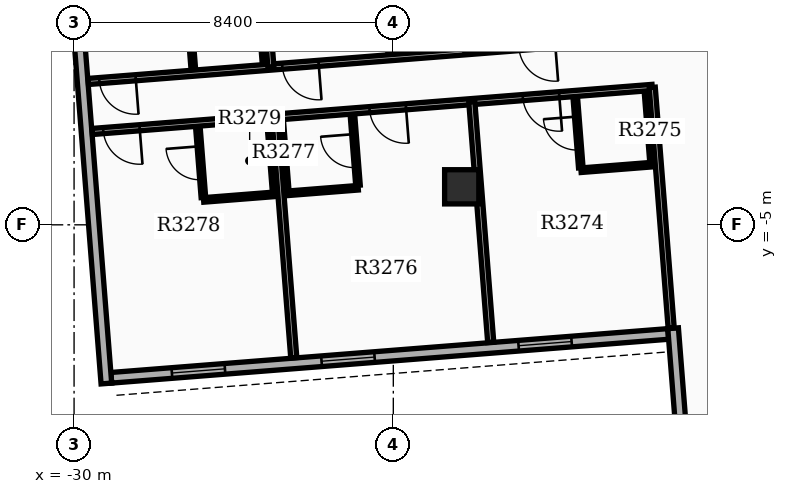
"""IFC4 building model, lengths in metres.
Left out: names, types, materials, properties, quantities, classifications, styles, units other than length and angle.
Written with IfcOpenShell. Run it as: python <this file> out.ifc"""

import sys

from ifc_helpers import new_model, si_unit, direction, frame, frame_2d, origin, origin_2d, place, context, subcontext, project, spatial, rectangle, extrude, element, fill, save


model = new_model("IFC4")
c1 = context("Model", 3, precision=1e-05, world=origin(), true_north=direction((0.0, 1.0)))
c2 = subcontext(c1, "Body", "Model", "MODEL_VIEW")
j1 = project(units=[si_unit("LENGTHUNIT", "METRE"), si_unit("PLANEANGLEUNIT", "RADIAN")], contexts=[c1])
p1 = place(None, origin())
s1 = spatial("IfcSite", under=j1, at=p1, CompositionType="ELEMENT")
p2 = place(p1, origin())
s2 = spatial("IfcBuilding", under=s1, at=p2, CompositionType="ELEMENT")
p3 = place(p2, frame((0.0, 0.0, 205.2)))
s3 = spatial("IfcBuildingStorey", under=s2, at=p3, CompositionType="ELEMENT", Elevation=205.2)
p4 = place(p3, frame((-19.8, -4.0, 0.0), z_axis=(0.0, 0.0, 1.0), x_axis=(1.0, 0.0, 0.0)))
e1 = element("IfcColumn", 1, at=p4, inside=s3, PredefinedType="COLUMN", context=c2, shape_type="SweptSolid", body=[
    extrude(rectangle(XDim=0.9, YDim=0.9, at=origin_2d()), origin(), (0.0, 0.0, 1.0), 3.9),
])
p5 = place(p3, frame((-29.021, -9.025, 0.0), z_axis=(0.0, 0.0, 1.0), x_axis=(0.996917526837, 0.078456642068, 0.0)))
e2 = element("IfcWall", 2, at=p5, inside=s3, PredefinedType="STANDARD", context=c2, shape_type="SweptSolid", body=[
    extrude(rectangle(XDim=14.7, YDim=0.28, at=frame_2d((7.35, 0.0))), origin(), (0.0, 0.0, 1.0), 3.18),
])
p6 = place(p5, frame((1.6, 0.0, 0.8)))
e3 = element("IfcOpeningElement", 3, at=p6, cuts=e2, PredefinedType="OPENING", context=c2, shape_type="SweptSolid", body=[
    extrude(rectangle(XDim=1.4, YDim=1.6, at=frame_2d((0.7, 0.8))), frame((0.0, 0.15, 0.0), z_axis=(0.0, -1.0, 0.0), x_axis=(1.0, 0.0, 0.0)), (0.0, 0.0, 1.0), 0.3),
])
p7 = place(p5, frame((5.55, 0.0, 0.8)))
e4 = element("IfcOpeningElement", 4, at=p7, cuts=e2, PredefinedType="OPENING", context=c2, shape_type="SweptSolid", body=[
    extrude(rectangle(XDim=1.4, YDim=1.6, at=frame_2d((0.7, 0.8))), frame((0.0, 0.15, 0.0), z_axis=(0.0, -1.0, 0.0), x_axis=(1.0, 0.0, 0.0)), (0.0, 0.0, 1.0), 0.3),
])
p8 = place(p5, frame((10.75, 0.0, 0.8)))
e5 = element("IfcOpeningElement", 5, at=p8, cuts=e2, PredefinedType="OPENING", context=c2, shape_type="SweptSolid", body=[
    extrude(rectangle(XDim=1.4, YDim=1.6, at=frame_2d((0.7, 0.8))), frame((0.0, 0.15, 0.0), z_axis=(0.0, -1.0, 0.0), x_axis=(1.0, 0.0, 0.0)), (0.0, 0.0, 1.0), 0.3),
])
p9 = place(p3, frame((-30.226, 4.502, 0.0), z_axis=(0.0, 0.0, 1.0), x_axis=(0.078457226018, -0.996917480881, 0.0)))
e6 = element("IfcWall", 6, at=p9, inside=s3, PredefinedType="STANDARD", context=c2, shape_type="SweptSolid", body=[
    extrude(rectangle(XDim=13.72, YDim=0.28, at=frame_2d((6.86, 0.0))), origin(), (0.0, 0.0, 1.0), 3.18),
])
p10 = place(p9, frame((0.85, 0.0, 0.85)))
e7 = element("IfcOpeningElement", 7, at=p10, cuts=e6, PredefinedType="OPENING", context=c2, shape_type="SweptSolid", body=[
    extrude(rectangle(XDim=1.0, YDim=1.5, at=frame_2d((0.5, 0.75))), frame((0.0, 0.15, 0.0), z_axis=(0.0, -1.0, 0.0), x_axis=(1.0, 0.0, 0.0)), (0.0, 0.0, 1.0), 0.3),
])
p11 = place(p3, frame((-14.238, -7.721, 0.0), z_axis=(0.0, 0.0, 1.0), x_axis=(0.078438149236, -0.996918982036, 0.0)))
e8 = element("IfcWall", 8, at=p11, inside=s3, PredefinedType="STANDARD", context=c2, shape_type="SweptSolid", body=[
    extrude(rectangle(XDim=6.86, YDim=0.28, at=frame_2d((3.43, 0.0))), origin(), (0.0, 0.0, 1.0), 3.18),
])
p12 = place(p3, frame((-14.89, -0.069, 0.0), z_axis=(0.0, 0.0, 1.0), x_axis=(-0.996917997344, -0.078450663299, 0.0)))
e9 = element("IfcWall", 9, at=p12, inside=s3, PredefinedType="PARTITIONING", context=c2, shape_type="SweptSolid", body=[
    extrude(rectangle(XDim=14.782, YDim=0.16, at=frame_2d((7.391, 0.0))), origin(), (0.0, 0.0, 1.0), 3.17),
])
p13 = place(p12, frame((2.456, 0.0, 0.0)))
e10 = element("IfcOpeningElement", 10, at=p13, cuts=e9, PredefinedType="OPENING", context=c2, shape_type="SweptSolid", body=[
    extrude(rectangle(XDim=0.96, YDim=2.15, at=frame_2d((0.48, 1.075))), frame((0.0, 0.09, 0.0), z_axis=(0.0, -1.0, 0.0), x_axis=(1.0, 0.0, 0.0)), (0.0, 0.0, 1.0), 0.18),
])
p14 = place(p12, frame((8.701, 0.0, 0.0)))
e11 = element("IfcOpeningElement", 11, at=p14, cuts=e9, PredefinedType="OPENING", context=c2, shape_type="SweptSolid", body=[
    extrude(rectangle(XDim=0.96, YDim=2.15, at=frame_2d((0.48, 1.075))), frame((0.0, 0.09, 0.0), z_axis=(0.0, -1.0, 0.0), x_axis=(1.0, 0.0, 0.0)), (0.0, 0.0, 1.0), 0.18),
])
p15 = place(p12, frame((13.53, 0.0, 0.0)))
e12 = element("IfcOpeningElement", 12, at=p15, cuts=e9, PredefinedType="OPENING", context=c2, shape_type="SweptSolid", body=[
    extrude(rectangle(XDim=0.96, YDim=2.15, at=frame_2d((0.48, 1.075))), frame((0.0, 0.09, 0.0), z_axis=(0.0, -1.0, 0.0), x_axis=(1.0, 0.0, 0.0)), (0.0, 0.0, 1.0), 0.18),
])
p16 = place(p3, frame((-24.821, -0.85, 0.0), z_axis=(0.0, 0.0, 1.0), x_axis=(-0.078480781753, 0.996915626769, 0.0)))
e13 = element("IfcWall", 13, at=p16, inside=s3, PredefinedType="PARTITIONING", context=c2, shape_type="SweptSolid", body=[
    extrude(rectangle(XDim=5.472, YDim=0.16, at=frame_2d((2.736, 0.0))), origin(), (0.0, 0.0, 1.0), 3.17),
])
p17 = place(p3, frame((-26.865, -0.871, 0.0), z_axis=(0.0, 0.0, 1.0), x_axis=(-0.0784709492, 0.996916400774, 0.0)))
e14 = element("IfcWall", 14, at=p17, inside=s3, PredefinedType="PARTITIONING", context=c2, shape_type="SweptSolid", body=[
    extrude(rectangle(XDim=1.82, YDim=0.12, at=frame_2d((0.91, 0.0))), origin(), (0.0, 0.0, 1.0), 3.17),
])
p18 = place(p17, frame((0.47, 0.0, 0.0)))
e15 = element("IfcOpeningElement", 15, at=p18, cuts=e14, PredefinedType="OPENING", context=c2, shape_type="SweptSolid", body=[
    extrude(rectangle(XDim=0.88, YDim=2.1, at=frame_2d((0.44, 1.05))), frame((0.0, 0.07, 0.0), z_axis=(0.0, -1.0, 0.0), x_axis=(1.0, 0.0, 0.0)), (0.0, 0.0, 1.0), 0.14),
])
p19 = place(p3, frame((-24.991, -0.723, 0.0), z_axis=(0.0, 0.0, 1.0), x_axis=(-0.078481444107, 0.996915574626, 0.0)))
e16 = element("IfcWall", 16, at=p19, inside=s3, PredefinedType="PARTITIONING", context=c2, shape_type="SweptSolid", body=[
    extrude(rectangle(XDim=1.82, YDim=0.12, at=frame_2d((0.91, 0.0))), origin(), (0.0, 0.0, 1.0), 3.17),
])
p20 = place(p3, frame((-14.787, -1.385, 0.0), z_axis=(0.0, 0.0, 1.0), x_axis=(-0.996917895694, -0.078451955012, 0.0)))
e17 = element("IfcWall", 17, at=p20, inside=s3, PredefinedType="PARTITIONING", context=c2, shape_type="SweptSolid", body=[
    extrude(rectangle(XDim=14.782, YDim=0.16, at=frame_2d((7.391, 0.0))), origin(), (0.0, 0.0, 1.0), 3.17),
])
p21 = place(p20, frame((2.456, 0.0, 0.0)))
e18 = element("IfcOpeningElement", 18, at=p21, cuts=e17, PredefinedType="OPENING", context=c2, shape_type="SweptSolid", body=[
    extrude(rectangle(XDim=0.96, YDim=2.15, at=frame_2d((0.48, 1.075))), frame((0.0, 0.09, 0.0), z_axis=(0.0, -1.0, 0.0), x_axis=(1.0, 0.0, 0.0)), (0.0, 0.0, 1.0), 0.18),
])
p22 = place(p20, frame((6.501, 0.0, 0.0)))
e19 = element("IfcOpeningElement", 19, at=p22, cuts=e17, PredefinedType="OPENING", context=c2, shape_type="SweptSolid", body=[
    extrude(rectangle(XDim=0.96, YDim=2.15, at=frame_2d((0.48, 1.075))), frame((0.0, 0.09, 0.0), z_axis=(0.0, -1.0, 0.0), x_axis=(1.0, 0.0, 0.0)), (0.0, 0.0, 1.0), 0.18),
])
p23 = place(p20, frame((13.53, 0.0, 0.0)))
e20 = element("IfcOpeningElement", 20, at=p23, cuts=e17, PredefinedType="OPENING", context=c2, shape_type="SweptSolid", body=[
    extrude(rectangle(XDim=0.96, YDim=2.15, at=frame_2d((0.48, 1.075))), frame((0.0, 0.09, 0.0), z_axis=(0.0, -1.0, 0.0), x_axis=(1.0, 0.0, 0.0)), (0.0, 0.0, 1.0), 0.18),
])
p24 = place(p3, frame((-14.787, -1.385, 0.0), z_axis=(0.0, 0.0, 1.0), x_axis=(0.078486363594, -0.99691518733, 0.0)))
e21 = element("IfcWall", 21, at=p24, inside=s3, PredefinedType="PARTITIONING", context=c2, shape_type="SweptSolid", body=[
    extrude(rectangle(XDim=6.352, YDim=0.16, at=frame_2d((3.176, 0.0))), origin(), (0.0, 0.0, 1.0), 3.17),
])
p25 = place(p3, frame((-19.535, -1.758, 0.0), z_axis=(0.0, 0.0, 1.0), x_axis=(0.078483356311, -0.996915424087, 0.0)))
e22 = element("IfcWall", 22, at=p25, inside=s3, PredefinedType="PARTITIONING", context=c2, shape_type="SweptSolid", body=[
    extrude(rectangle(XDim=6.352, YDim=0.16, at=frame_2d((3.176, 0.0))), origin(), (0.0, 0.0, 1.0), 3.17),
])
p26 = place(p3, frame((-16.667, -3.499, 0.0), z_axis=(0.0, 0.0, 1.0), x_axis=(-0.0784709492, 0.996916400774, 0.0)))
e23 = element("IfcWall", 23, at=p26, inside=s3, PredefinedType="PARTITIONING", context=c2, shape_type="SweptSolid", body=[
    extrude(rectangle(XDim=1.82, YDim=0.12, at=frame_2d((0.91, 0.0))), origin(), (0.0, 0.0, 1.0), 3.17),
])
p27 = place(p26, frame((0.47, 0.0, 0.0)))
e24 = element("IfcOpeningElement", 24, at=p27, cuts=e23, PredefinedType="OPENING", context=c2, shape_type="SweptSolid", body=[
    extrude(rectangle(XDim=0.88, YDim=2.1, at=frame_2d((0.44, 1.05))), frame((0.0, 0.07, 0.0), z_axis=(0.0, -1.0, 0.0), x_axis=(1.0, 0.0, 0.0)), (0.0, 0.0, 1.0), 0.14),
])
p28 = place(p3, frame((-14.793, -3.351, 0.0), z_axis=(0.0, 0.0, 1.0), x_axis=(-0.0784709492, 0.996916400774, 0.0)))
e25 = element("IfcWall", 25, at=p28, inside=s3, PredefinedType="PARTITIONING", context=c2, shape_type="SweptSolid", body=[
    extrude(rectangle(XDim=1.82, YDim=0.12, at=frame_2d((0.91, 0.0))), origin(), (0.0, 0.0, 1.0), 3.17),
])
p29 = place(p3, frame((-14.788, -3.416, 0.0), z_axis=(0.0, 0.0, 1.0), x_axis=(-0.996919293781, -0.07843418698, 0.0)))
e26 = element("IfcWall", 26, at=p29, inside=s3, PredefinedType="PARTITIONING", context=c2, shape_type="SweptSolid", body=[
    extrude(rectangle(XDim=1.88, YDim=0.12, at=frame_2d((0.94, 0.0))), origin(), (0.0, 0.0, 1.0), 3.17),
])
p30 = place(p3, frame((-24.717, -2.166, 0.0), z_axis=(0.0, 0.0, 1.0), x_axis=(0.078448164166, -0.996918194005, 0.0)))
e27 = element("IfcWall", 27, at=p30, inside=s3, PredefinedType="PARTITIONING", context=c2, shape_type="SweptSolid", body=[
    extrude(rectangle(XDim=6.352, YDim=0.16, at=frame_2d((3.176, 0.0))), origin(), (0.0, 0.0, 1.0), 3.17),
])
p31 = place(p3, frame((-22.53, -3.96, 0.0), z_axis=(0.0, 0.0, 1.0), x_axis=(-0.0784709492, 0.996916400774, 0.0)))
e28 = element("IfcWall", 28, at=p31, inside=s3, PredefinedType="PARTITIONING", context=c2, shape_type="SweptSolid", body=[
    extrude(rectangle(XDim=1.82, YDim=0.12, at=frame_2d((0.91, 0.0))), origin(), (0.0, 0.0, 1.0), 3.17),
])
p32 = place(p31, frame((0.47, 0.0, 0.0)))
e29 = element("IfcOpeningElement", 29, at=p32, cuts=e28, PredefinedType="OPENING", context=c2, shape_type="SweptSolid", body=[
    extrude(rectangle(XDim=0.88, YDim=2.1, at=frame_2d((0.44, 1.05))), frame((0.0, 0.07, 0.0), z_axis=(0.0, -1.0, 0.0), x_axis=(1.0, 0.0, 0.0)), (0.0, 0.0, 1.0), 0.14),
])
p33 = place(p3, frame((-24.404, -4.107, 0.0), z_axis=(0.0, 0.0, 1.0), x_axis=(-0.0784709492, 0.996916400774, 0.0)))
e30 = element("IfcWall", 30, at=p33, inside=s3, PredefinedType="PARTITIONING", context=c2, shape_type="SweptSolid", body=[
    extrude(rectangle(XDim=1.82, YDim=0.12, at=frame_2d((0.91, 0.0))), origin(), (0.0, 0.0, 1.0), 3.17),
])
p34 = place(p3, frame((-22.525, -4.025, 0.0), z_axis=(0.0, 0.0, 1.0), x_axis=(-0.996919293781, -0.07843418698, 0.0)))
e31 = element("IfcWall", 31, at=p34, inside=s3, PredefinedType="PARTITIONING", context=c2, shape_type="SweptSolid", body=[
    extrude(rectangle(XDim=1.88, YDim=0.12, at=frame_2d((0.94, 0.0))), origin(), (0.0, 0.0, 1.0), 3.17),
])
p35 = place(p3, frame((-26.597, -4.28, 0.0), z_axis=(0.0, 0.0, 1.0), x_axis=(-0.0784709492, 0.996916400774, 0.0)))
e32 = element("IfcWall", 32, at=p35, inside=s3, PredefinedType="PARTITIONING", context=c2, shape_type="SweptSolid", body=[
    extrude(rectangle(XDim=1.82, YDim=0.12, at=frame_2d((0.91, 0.0))), origin(), (0.0, 0.0, 1.0), 3.17),
])
p36 = place(p35, frame((0.47, 0.0, 0.0)))
e33 = element("IfcOpeningElement", 33, at=p36, cuts=e32, PredefinedType="OPENING", context=c2, shape_type="SweptSolid", body=[
    extrude(rectangle(XDim=0.88, YDim=2.1, at=frame_2d((0.44, 1.05))), frame((0.0, 0.07, 0.0), z_axis=(0.0, -1.0, 0.0), x_axis=(1.0, 0.0, 0.0)), (0.0, 0.0, 1.0), 0.14),
])
p37 = place(p3, frame((-24.723, -4.133, 0.0), z_axis=(0.0, 0.0, 1.0), x_axis=(-0.0784709492, 0.996916400774, 0.0)))
e34 = element("IfcWall", 34, at=p37, inside=s3, PredefinedType="PARTITIONING", context=c2, shape_type="SweptSolid", body=[
    extrude(rectangle(XDim=1.82, YDim=0.12, at=frame_2d((0.91, 0.0))), origin(), (0.0, 0.0, 1.0), 3.17),
])
p38 = place(p3, frame((-24.718, -4.197, 0.0), z_axis=(0.0, 0.0, 1.0), x_axis=(-0.99691849475, -0.078444342213, 0.0)))
e35 = element("IfcWall", 35, at=p38, inside=s3, PredefinedType="PARTITIONING", context=c2, shape_type="SweptSolid", body=[
    extrude(rectangle(XDim=1.88, YDim=0.12, at=frame_2d((0.94, 0.0))), origin(), (0.0, 0.0, 1.0), 3.17),
])
p39 = place(p6, origin())
e36 = element("IfcWindow", 36, at=p39, inside=s3, PartitioningType="SINGLE_PANEL", PredefinedType="WINDOW", context=c2, shape_type="SweptSolid", body=[
    extrude(rectangle(XDim=1.4, YDim=1.6, at=frame_2d((0.7, 0.8))), frame((0.0, 0.03, 0.0), z_axis=(0.0, -1.0, 0.0), x_axis=(1.0, 0.0, 0.0)), (0.0, 0.0, 1.0), 0.06),
])
fill(e3, e36)
p40 = place(p7, origin())
e37 = element("IfcWindow", 37, at=p40, inside=s3, PartitioningType="SINGLE_PANEL", PredefinedType="WINDOW", context=c2, shape_type="SweptSolid", body=[
    extrude(rectangle(XDim=1.4, YDim=1.6, at=frame_2d((0.7, 0.8))), frame((0.0, 0.03, 0.0), z_axis=(0.0, -1.0, 0.0), x_axis=(1.0, 0.0, 0.0)), (0.0, 0.0, 1.0), 0.06),
])
fill(e4, e37)
p41 = place(p8, origin())
e38 = element("IfcWindow", 38, at=p41, inside=s3, PartitioningType="SINGLE_PANEL", PredefinedType="WINDOW", context=c2, shape_type="SweptSolid", body=[
    extrude(rectangle(XDim=1.4, YDim=1.6, at=frame_2d((0.7, 0.8))), frame((0.0, 0.03, 0.0), z_axis=(0.0, -1.0, 0.0), x_axis=(1.0, 0.0, 0.0)), (0.0, 0.0, 1.0), 0.06),
])
fill(e5, e38)
p42 = place(p14, origin())
e39 = element("IfcDoor", 39, at=p42, inside=s3, OperationType="SINGLE_SWING_LEFT", PredefinedType="DOOR", context=c2, shape_type="SweptSolid", body=[
    extrude(rectangle(XDim=0.96, YDim=2.15, at=frame_2d((0.48, 1.075))), frame((0.0, 0.025, 0.0), z_axis=(0.0, -1.0, 0.0), x_axis=(1.0, 0.0, 0.0)), (0.0, 0.0, 1.0), 0.05),
])
fill(e11, e39)
p43 = place(p15, origin())
e40 = element("IfcDoor", 40, at=p43, inside=s3, OperationType="SINGLE_SWING_LEFT", PredefinedType="DOOR", context=c2, shape_type="SweptSolid", body=[
    extrude(rectangle(XDim=0.96, YDim=2.15, at=frame_2d((0.48, 1.075))), frame((0.0, 0.025, 0.0), z_axis=(0.0, -1.0, 0.0), x_axis=(1.0, 0.0, 0.0)), (0.0, 0.0, 1.0), 0.05),
])
fill(e12, e40)
p44 = place(p21, origin())
e41 = element("IfcDoor", 41, at=p44, inside=s3, OperationType="SINGLE_SWING_LEFT", PredefinedType="DOOR", context=c2, shape_type="SweptSolid", body=[
    extrude(rectangle(XDim=0.96, YDim=2.15, at=frame_2d((0.48, 1.075))), frame((0.0, 0.025, 0.0), z_axis=(0.0, -1.0, 0.0), x_axis=(1.0, 0.0, 0.0)), (0.0, 0.0, 1.0), 0.05),
])
fill(e18, e41)
p45 = place(p27, origin())
e42 = element("IfcDoor", 42, at=p45, inside=s3, OperationType="SINGLE_SWING_RIGHT", PredefinedType="DOOR", context=c2, shape_type="SweptSolid", body=[
    extrude(rectangle(XDim=0.88, YDim=2.1, at=frame_2d((0.44, 1.05))), frame((0.0, 0.025, 0.0), z_axis=(0.0, -1.0, 0.0), x_axis=(1.0, 0.0, 0.0)), (0.0, 0.0, 1.0), 0.05),
])
fill(e24, e42)
p46 = place(p22, origin())
e43 = element("IfcDoor", 43, at=p46, inside=s3, OperationType="SINGLE_SWING_LEFT", PredefinedType="DOOR", context=c2, shape_type="SweptSolid", body=[
    extrude(rectangle(XDim=0.96, YDim=2.15, at=frame_2d((0.48, 1.075))), frame((0.0, 0.025, 0.0), z_axis=(0.0, -1.0, 0.0), x_axis=(1.0, 0.0, 0.0)), (0.0, 0.0, 1.0), 0.05),
])
fill(e19, e43)
p47 = place(p32, origin())
e44 = element("IfcDoor", 44, at=p47, inside=s3, OperationType="SINGLE_SWING_RIGHT", PredefinedType="DOOR", context=c2, shape_type="SweptSolid", body=[
    extrude(rectangle(XDim=0.88, YDim=2.1, at=frame_2d((0.44, 1.05))), frame((0.0, 0.025, 0.0), z_axis=(0.0, -1.0, 0.0), x_axis=(1.0, 0.0, 0.0)), (0.0, 0.0, 1.0), 0.05),
])
fill(e29, e44)
p48 = place(p23, origin())
e45 = element("IfcDoor", 45, at=p48, inside=s3, OperationType="SINGLE_SWING_LEFT", PredefinedType="DOOR", context=c2, shape_type="SweptSolid", body=[
    extrude(rectangle(XDim=0.96, YDim=2.15, at=frame_2d((0.48, 1.075))), frame((0.0, 0.025, 0.0), z_axis=(0.0, -1.0, 0.0), x_axis=(1.0, 0.0, 0.0)), (0.0, 0.0, 1.0), 0.05),
])
fill(e20, e45)
p49 = place(p36, origin())
e46 = element("IfcDoor", 46, at=p49, inside=s3, OperationType="SINGLE_SWING_RIGHT", PredefinedType="DOOR", context=c2, shape_type="SweptSolid", body=[
    extrude(rectangle(XDim=0.88, YDim=2.1, at=frame_2d((0.44, 1.05))), frame((0.0, 0.025, 0.0), z_axis=(0.0, -1.0, 0.0), x_axis=(1.0, 0.0, 0.0)), (0.0, 0.0, 1.0), 0.05),
])
fill(e33, e46)
save(model, sys.argv[1])
